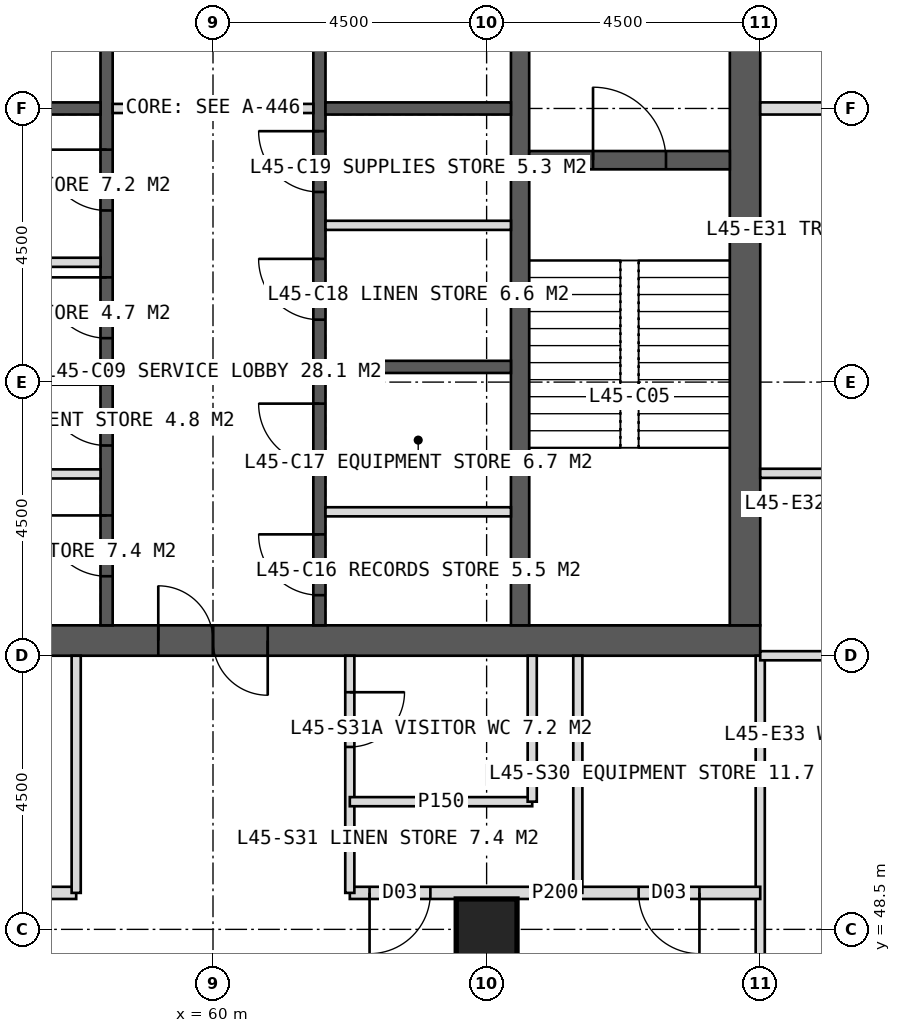
"""IFC4 building model, lengths in metres.
Left out: names, types, materials, properties, quantities, classifications, styles, units other than length and angle.
Written with IfcOpenShell. Run it as: python <this file> out.ifc"""

import sys

from ifc_helpers import new_model, si_unit, direction, frame, frame_2d, origin, origin_2d, place, context, subcontext, project, spatial, rectangle, hollow_rectangle, extrude, element, fill, save


model = new_model("IFC4")
c1 = context("Model", 3, precision=1e-05, world=origin(), true_north=direction((0.0, 1.0)))
c2 = subcontext(c1, "Body", "Model", "MODEL_VIEW")
j1 = project(units=[si_unit("LENGTHUNIT", "METRE"), si_unit("PLANEANGLEUNIT", "RADIAN")], contexts=[c1])
p1 = place(None, origin())
s1 = spatial("IfcSite", under=j1, at=p1, CompositionType="ELEMENT")
p2 = place(p1, origin())
s2 = spatial("IfcBuilding", under=s1, at=p2, CompositionType="ELEMENT")
p3 = place(p2, frame((0.0, 0.0, 189.0)))
s3 = spatial("IfcBuildingStorey", under=s2, at=p3, CompositionType="ELEMENT", Elevation=189.0)
p4 = place(p3, frame((51.0, 53.25, 0.0), z_axis=(0.0, 0.0, 1.0), x_axis=(1.0, 0.0, 0.0)))
e1 = element("IfcWall", 1, at=p4, inside=s3, PredefinedType="SHEAR", context=c2, shape_type="SweptSolid", body=[
    extrude(rectangle(XDim=18.0, YDim=0.5, at=frame_2d((9.0, 0.0))), origin(), (0.0, 0.0, 1.0), 4.0),
])
p5 = place(p4, frame((8.1, 0.0, 0.0)))
e2 = element("IfcOpeningElement", 2, at=p5, cuts=e1, PredefinedType="OPENING", context=c2, shape_type="SweptSolid", body=[
    extrude(rectangle(XDim=1.8, YDim=2.2, at=frame_2d((0.9, 1.1))), frame((0.0, 0.26, 0.0), z_axis=(0.0, -1.0, 0.0), x_axis=(1.0, 0.0, 0.0)), (0.0, 0.0, 1.0), 0.52),
])
p6 = place(p3, frame((68.75, 53.5, 0.0), z_axis=(0.0, 0.0, 1.0), x_axis=(0.0, 1.0, 0.0)))
e3 = element("IfcWall", 3, at=p6, inside=s3, PredefinedType="SHEAR", context=c2, shape_type="SweptSolid", body=[
    extrude(rectangle(XDim=17.0, YDim=0.5, at=frame_2d((8.5, 0.0))), origin(), (0.0, 0.0, 1.0), 4.0),
])
p7 = place(p6, frame((9.6, 0.0, 0.0)))
e4 = element("IfcOpeningElement", 4, at=p7, cuts=e3, PredefinedType="OPENING", context=c2, shape_type="SweptSolid", body=[
    extrude(rectangle(XDim=1.5, YDim=2.2, at=frame_2d((0.75, 1.1))), frame((0.0, 0.26, 0.0), z_axis=(0.0, -1.0, 0.0), x_axis=(1.0, 0.0, 0.0)), (0.0, 0.0, 1.0), 0.52),
])
p8 = place(p3, frame((65.05, 53.5, 0.0), z_axis=(0.0, 0.0, 1.0), x_axis=(0.0, 1.0, 0.0)))
e5 = element("IfcWall", 5, at=p8, inside=s3, PredefinedType="SHEAR", context=c2, shape_type="SweptSolid", body=[
    extrude(rectangle(XDim=17.0, YDim=0.3, at=frame_2d((8.5, 0.0))), origin(), (0.0, 0.0, 1.0), 4.0),
])
p9 = place(p3, frame((58.25, 53.5, 0.0), z_axis=(0.0, 0.0, 1.0), x_axis=(0.0, 1.0, 0.0)))
e6 = element("IfcWall", 6, at=p9, inside=s3, PredefinedType="SHEAR", context=c2, shape_type="SweptSolid", body=[
    extrude(rectangle(XDim=17.0, YDim=0.2, at=frame_2d((8.5, 0.0))), origin(), (0.0, 0.0, 1.0), 4.0),
])
p10 = place(p9, frame((0.808, 0.0, 0.0)))
e7 = element("IfcOpeningElement", 7, at=p10, cuts=e6, PredefinedType="OPENING", context=c2, shape_type="SweptSolid", body=[
    extrude(rectangle(XDim=1.0, YDim=2.1, at=frame_2d((0.5, 1.05))), frame((0.0, 0.11, 0.0), z_axis=(0.0, -1.0, 0.0), x_axis=(1.0, 0.0, 0.0)), (0.0, 0.0, 1.0), 0.22),
])
p11 = place(p9, frame((2.958, 0.0, 0.0)))
e8 = element("IfcOpeningElement", 8, at=p11, cuts=e6, PredefinedType="OPENING", context=c2, shape_type="SweptSolid", body=[
    extrude(rectangle(XDim=1.0, YDim=2.1, at=frame_2d((0.5, 1.05))), frame((0.0, 0.11, 0.0), z_axis=(0.0, -1.0, 0.0), x_axis=(1.0, 0.0, 0.0)), (0.0, 0.0, 1.0), 0.22),
])
p12 = place(p9, frame((4.722, 0.0, 0.0)))
e9 = element("IfcOpeningElement", 9, at=p12, cuts=e6, PredefinedType="OPENING", context=c2, shape_type="SweptSolid", body=[
    extrude(rectangle(XDim=1.0, YDim=2.1, at=frame_2d((0.5, 1.05))), frame((0.0, 0.11, 0.0), z_axis=(0.0, -1.0, 0.0), x_axis=(1.0, 0.0, 0.0)), (0.0, 0.0, 1.0), 0.22),
])
p13 = place(p9, frame((6.823, 0.0, 0.0)))
e10 = element("IfcOpeningElement", 10, at=p13, cuts=e6, PredefinedType="OPENING", context=c2, shape_type="SweptSolid", body=[
    extrude(rectangle(XDim=1.0, YDim=2.1, at=frame_2d((0.5, 1.05))), frame((0.0, 0.11, 0.0), z_axis=(0.0, -1.0, 0.0), x_axis=(1.0, 0.0, 0.0)), (0.0, 0.0, 1.0), 0.22),
])
p14 = place(p9, frame((10.025, 0.0, 0.0)))
e11 = element("IfcOpeningElement", 11, at=p14, cuts=e6, PredefinedType="OPENING", context=c2, shape_type="SweptSolid", body=[
    extrude(rectangle(XDim=1.4, YDim=2.2, at=frame_2d((0.7, 1.1))), frame((0.0, 0.11, 0.0), z_axis=(0.0, -1.0, 0.0), x_axis=(1.0, 0.0, 0.0)), (0.0, 0.0, 1.0), 0.22),
])
p15 = place(p9, frame((14.325, 0.0, 0.0)))
e12 = element("IfcOpeningElement", 12, at=p15, cuts=e6, PredefinedType="OPENING", context=c2, shape_type="SweptSolid", body=[
    extrude(rectangle(XDim=1.4, YDim=2.2, at=frame_2d((0.7, 1.1))), frame((0.0, 0.11, 0.0), z_axis=(0.0, -1.0, 0.0), x_axis=(1.0, 0.0, 0.0)), (0.0, 0.0, 1.0), 0.22),
])
p16 = place(p3, frame((61.75, 53.5, 0.0), z_axis=(0.0, 0.0, 1.0), x_axis=(0.0, 1.0, 0.0)))
e13 = element("IfcWall", 13, at=p16, inside=s3, PredefinedType="SHEAR", context=c2, shape_type="SweptSolid", body=[
    extrude(rectangle(XDim=17.0, YDim=0.2, at=frame_2d((8.5, 0.0))), origin(), (0.0, 0.0, 1.0), 4.0),
])
p17 = place(p16, frame((0.496, 0.0, 0.0)))
e14 = element("IfcOpeningElement", 14, at=p17, cuts=e13, PredefinedType="OPENING", context=c2, shape_type="SweptSolid", body=[
    extrude(rectangle(XDim=1.0, YDim=2.1, at=frame_2d((0.5, 1.05))), frame((0.0, 0.11, 0.0), z_axis=(0.0, -1.0, 0.0), x_axis=(1.0, 0.0, 0.0)), (0.0, 0.0, 1.0), 0.22),
])
p18 = place(p16, frame((2.646, 0.0, 0.0)))
e15 = element("IfcOpeningElement", 15, at=p18, cuts=e13, PredefinedType="OPENING", context=c2, shape_type="SweptSolid", body=[
    extrude(rectangle(XDim=1.0, YDim=2.1, at=frame_2d((0.5, 1.05))), frame((0.0, 0.11, 0.0), z_axis=(0.0, -1.0, 0.0), x_axis=(1.0, 0.0, 0.0)), (0.0, 0.0, 1.0), 0.22),
])
p19 = place(p16, frame((5.027, 0.0, 0.0)))
e16 = element("IfcOpeningElement", 16, at=p19, cuts=e13, PredefinedType="OPENING", context=c2, shape_type="SweptSolid", body=[
    extrude(rectangle(XDim=1.0, YDim=2.1, at=frame_2d((0.5, 1.05))), frame((0.0, 0.11, 0.0), z_axis=(0.0, -1.0, 0.0), x_axis=(1.0, 0.0, 0.0)), (0.0, 0.0, 1.0), 0.22),
])
p20 = place(p16, frame((7.126, 0.0, 0.0)))
e17 = element("IfcOpeningElement", 17, at=p20, cuts=e13, PredefinedType="OPENING", context=c2, shape_type="SweptSolid", body=[
    extrude(rectangle(XDim=1.0, YDim=2.1, at=frame_2d((0.5, 1.05))), frame((0.0, 0.11, 0.0), z_axis=(0.0, -1.0, 0.0), x_axis=(1.0, 0.0, 0.0)), (0.0, 0.0, 1.0), 0.22),
])
p21 = place(p16, frame((10.025, 0.0, 0.0)))
e18 = element("IfcOpeningElement", 18, at=p21, cuts=e13, PredefinedType="OPENING", context=c2, shape_type="SweptSolid", body=[
    extrude(rectangle(XDim=1.4, YDim=2.2, at=frame_2d((0.7, 1.1))), frame((0.0, 0.11, 0.0), z_axis=(0.0, -1.0, 0.0), x_axis=(1.0, 0.0, 0.0)), (0.0, 0.0, 1.0), 0.22),
])
p22 = place(p16, frame((14.325, 0.0, 0.0)))
e19 = element("IfcOpeningElement", 19, at=p22, cuts=e13, PredefinedType="OPENING", context=c2, shape_type="SweptSolid", body=[
    extrude(rectangle(XDim=1.4, YDim=2.2, at=frame_2d((0.7, 1.1))), frame((0.0, 0.11, 0.0), z_axis=(0.0, -1.0, 0.0), x_axis=(1.0, 0.0, 0.0)), (0.0, 0.0, 1.0), 0.22),
])
for number, where, z_axis, x_axis in (
    (20, (55.1, 57.75, 0.0), (0.0, 0.0, 1.0), (1.0, 0.0, 0.0)),
    (21, (61.85, 57.75, 0.0), (0.0, 0.0, 1.0), (1.0, 0.0, 0.0)),
    (22, (55.1, 62.0, 0.0), (0.0, 0.0, 1.0), (1.0, 0.0, 0.0)),
    (23, (61.85, 62.0, 0.0), (0.0, 0.0, 1.0), (1.0, 0.0, 0.0)),
):
    element("IfcWall", number, at=place(p3, frame(where, z_axis=z_axis, x_axis=x_axis)), inside=s3, PredefinedType="SHEAR", context=c2, shape_type="SweptSolid", body=[
        extrude(rectangle(XDim=3.05, YDim=0.2, at=frame_2d((1.525, 0.0))), origin(), (0.0, 0.0, 1.0), 4.0),
    ])
p23 = place(p3, frame((65.2, 61.15, 0.0), z_axis=(0.0, 0.0, 1.0), x_axis=(1.0, 0.0, 0.0)))
e24 = element("IfcWall", 24, at=p23, inside=s3, PredefinedType="SHEAR", context=c2, shape_type="SweptSolid", body=[
    extrude(rectangle(XDim=3.3, YDim=0.3, at=frame_2d((1.65, 0.0))), origin(), (0.0, 0.0, 1.0), 4.0),
])
p24 = place(p23, frame((1.05, 0.0, 0.0)))
e25 = element("IfcOpeningElement", 25, at=p24, cuts=e24, PredefinedType="OPENING", context=c2, shape_type="SweptSolid", body=[
    extrude(rectangle(XDim=1.2, YDim=2.1, at=frame_2d((0.6, 1.05))), frame((0.0, 0.16, 0.0), z_axis=(0.0, -1.0, 0.0), x_axis=(1.0, 0.0, 0.0)), (0.0, 0.0, 1.0), 0.32),
])
p25 = place(p3, frame((64.5, 48.5, 0.0), z_axis=(0.0, 0.0, 1.0), x_axis=(1.0, 0.0, 0.0)))
e26 = element("IfcColumn", 26, at=p25, inside=s3, PredefinedType="COLUMN", context=c2, shape_type="SweptSolid", body=[
    extrude(hollow_rectangle(XDim=1.0, YDim=1.0, WallThickness=0.1, at=origin_2d()), origin(), (0.0, 0.0, 1.0), 4.0),
])
p26 = place(p3, frame((69.0, 53.0, 0.0), z_axis=(0.0, 0.0, 1.0), x_axis=(0.0, -1.0, 0.0)))
e27 = element("IfcWall", 27, at=p26, inside=s3, PredefinedType="PARTITIONING", context=c2, shape_type="SweptSolid", body=[
    extrude(rectangle(XDim=5.4, YDim=0.15, at=frame_2d((2.7, 0.0))), origin(), (0.0, 0.0, 1.0), 3.75),
])
p27 = place(p3, frame((69.0, 49.1, 0.0), z_axis=(0.0, 0.0, 1.0), x_axis=(-1.0, 0.0, 0.0)))
e28 = element("IfcWall", 28, at=p27, inside=s3, PredefinedType="PARTITIONING", context=c2, shape_type="SweptSolid", body=[
    extrude(rectangle(XDim=6.75, YDim=0.2, at=frame_2d((3.375, 0.0))), origin(), (0.0, 0.0, 1.0), 3.75),
])
p28 = place(p27, frame((1.0, 0.0, 0.0)))
e29 = element("IfcOpeningElement", 29, at=p28, cuts=e28, PredefinedType="OPENING", context=c2, shape_type="SweptSolid", body=[
    extrude(rectangle(XDim=1.0, YDim=2.1, at=frame_2d((0.5, 1.05))), frame((0.0, 0.11, 0.0), z_axis=(0.0, -1.0, 0.0), x_axis=(1.0, 0.0, 0.0)), (0.0, 0.0, 1.0), 0.22),
])
p29 = place(p27, frame((5.425, 0.0, 0.0)))
e30 = element("IfcOpeningElement", 30, at=p29, cuts=e28, PredefinedType="OPENING", context=c2, shape_type="SweptSolid", body=[
    extrude(rectangle(XDim=1.0, YDim=2.1, at=frame_2d((0.5, 1.05))), frame((0.0, 0.11, 0.0), z_axis=(0.0, -1.0, 0.0), x_axis=(1.0, 0.0, 0.0)), (0.0, 0.0, 1.0), 0.22),
])
p30 = place(p3, frame((57.75, 49.1, 0.0), z_axis=(0.0, 0.0, 1.0), x_axis=(-1.0, 0.0, 0.0)))
e31 = element("IfcWall", 31, at=p30, inside=s3, PredefinedType="PARTITIONING", context=c2, shape_type="SweptSolid", body=[
    extrude(rectangle(XDim=12.15, YDim=0.2, at=frame_2d((6.075, 0.0))), origin(), (0.0, 0.0, 1.0), 3.75),
])
p31 = place(p30, frame((4.3, 0.0, 0.0)))
e32 = element("IfcOpeningElement", 32, at=p31, cuts=e31, PredefinedType="OPENING", context=c2, shape_type="SweptSolid", body=[
    extrude(rectangle(XDim=1.0, YDim=2.1, at=frame_2d((0.5, 1.05))), frame((0.0, 0.11, 0.0), z_axis=(0.0, -1.0, 0.0), x_axis=(1.0, 0.0, 0.0)), (0.0, 0.0, 1.0), 0.22),
])
p32 = place(p30, frame((8.95, 0.0, 0.0)))
e33 = element("IfcOpeningElement", 33, at=p32, cuts=e31, PredefinedType="OPENING", context=c2, shape_type="SweptSolid", body=[
    extrude(rectangle(XDim=1.0, YDim=2.1, at=frame_2d((0.5, 1.05))), frame((0.0, 0.11, 0.0), z_axis=(0.0, -1.0, 0.0), x_axis=(1.0, 0.0, 0.0)), (0.0, 0.0, 1.0), 0.22),
])
p33 = place(p3, frame((62.25, 53.0, 0.0), z_axis=(0.0, 0.0, 1.0), x_axis=(0.0, -1.0, 0.0)))
e34 = element("IfcWall", 34, at=p33, inside=s3, PredefinedType="PARTITIONING", context=c2, shape_type="SweptSolid", body=[
    extrude(rectangle(XDim=3.9, YDim=0.15, at=frame_2d((1.95, 0.0))), origin(), (0.0, 0.0, 1.0), 3.75),
])
p34 = place(p33, frame((0.6, 0.0, 0.0)))
e35 = element("IfcOpeningElement", 35, at=p34, cuts=e34, PredefinedType="OPENING", context=c2, shape_type="SweptSolid", body=[
    extrude(rectangle(XDim=0.9, YDim=2.1, at=frame_2d((0.45, 1.05))), frame((0.0, 0.085, 0.0), z_axis=(0.0, -1.0, 0.0), x_axis=(1.0, 0.0, 0.0)), (0.0, 0.0, 1.0), 0.17),
])
for number, where, z_axis, x_axis in (
    (36, (57.75, 53.0, 0.0), (0.0, 0.0, 1.0), (0.0, -1.0, 0.0)),
    (37, (66.0, 53.0, 0.0), (0.0, 0.0, 1.0), (0.0, -1.0, 0.0)),
):
    element("IfcWall", number, at=place(p3, frame(where, z_axis=z_axis, x_axis=x_axis)), inside=s3, PredefinedType="PARTITIONING", context=c2, shape_type="SweptSolid", body=[
        extrude(rectangle(XDim=3.9, YDim=0.15, at=frame_2d((1.95, 0.0))), origin(), (0.0, 0.0, 1.0), 3.75),
    ])
p35 = place(p3, frame((65.25, 50.6, 0.0), z_axis=(0.0, 0.0, 1.0), x_axis=(-1.0, 0.0, 0.0)))
e38 = element("IfcWall", 38, at=p35, inside=s3, PredefinedType="PARTITIONING", context=c2, shape_type="SweptSolid", body=[
    extrude(rectangle(XDim=3.0, YDim=0.15, at=frame_2d((1.5, 0.0))), origin(), (0.0, 0.0, 1.0), 3.75),
])
p36 = place(p3, frame((65.25, 53.0, 0.0), z_axis=(0.0, 0.0, 1.0), x_axis=(0.0, -1.0, 0.0)))
e39 = element("IfcWall", 39, at=p36, inside=s3, PredefinedType="PARTITIONING", context=c2, shape_type="SweptSolid", body=[
    extrude(rectangle(XDim=2.4, YDim=0.15, at=frame_2d((1.2, 0.0))), origin(), (0.0, 0.0, 1.0), 3.75),
])
p37 = place(p3, frame((69.0, 62.0, 0.0), z_axis=(0.0, 0.0, 1.0), x_axis=(1.0, 0.0, 0.0)))
e40 = element("IfcWall", 40, at=p37, inside=s3, PredefinedType="SOLIDWALL", context=c2, shape_type="SweptSolid", body=[
    extrude(rectangle(XDim=5.4, YDim=0.2, at=frame_2d((2.7, 0.0))), origin(), (0.0, 0.0, 1.0), 2.95),
])
for number, where, z_axis, x_axis in (
    (41, (69.0, 56.0, 0.0), (0.0, 0.0, 1.0), (1.0, 0.0, 0.0)),
    (42, (69.0, 53.0, 0.0), (0.0, 0.0, 1.0), (1.0, 0.0, 0.0)),
):
    element("IfcWall", number, at=place(p3, frame(where, z_axis=z_axis, x_axis=x_axis)), inside=s3, PredefinedType="PARTITIONING", context=c2, shape_type="SweptSolid", body=[
        extrude(rectangle(XDim=5.4, YDim=0.15, at=frame_2d((2.7, 0.0))), origin(), (0.0, 0.0, 1.0), 3.75),
    ])
for number, where, z_axis, x_axis in (
    (43, (55.1, 55.99, 0.0), (0.0, 0.0, 1.0), (1.0, 0.0, 0.0)),
    (44, (61.85, 55.367, 0.0), (0.0, 0.0, 1.0), (1.0, 0.0, 0.0)),
    (45, (55.1, 59.47, 0.0), (0.0, 0.0, 1.0), (1.0, 0.0, 0.0)),
    (46, (61.85, 60.078, 0.0), (0.0, 0.0, 1.0), (1.0, 0.0, 0.0)),
):
    element("IfcWall", number, at=place(p3, frame(where, z_axis=z_axis, x_axis=x_axis)), inside=s3, PredefinedType="PARTITIONING", context=c2, shape_type="SweptSolid", body=[
        extrude(rectangle(XDim=3.05, YDim=0.15, at=frame_2d((1.525, 0.0))), origin(), (0.0, 0.0, 1.0), 3.75),
    ])
p38 = place(p3, frame((58.35, 62.0, 0.0), z_axis=(0.0, 0.0, 1.0), x_axis=(1.0, 0.0, 0.0)))
e47 = element("IfcWall", 47, at=p38, inside=s3, PredefinedType="PARTITIONING", context=c2, shape_type="SweptSolid", body=[
    extrude(rectangle(XDim=3.3, YDim=0.15, at=frame_2d((1.65, 0.0))), origin(), (0.0, 0.0, 1.0), 3.75),
])
p39 = place(p28, origin())
e48 = element("IfcDoor", 48, at=p39, inside=s3, OperationType="SINGLE_SWING_LEFT", PredefinedType="DOOR", context=c2, shape_type="SweptSolid", body=[
    extrude(rectangle(XDim=1.0, YDim=2.1, at=frame_2d((0.5, 1.05))), frame((0.0, 0.025, 0.0), z_axis=(0.0, -1.0, 0.0), x_axis=(1.0, 0.0, 0.0)), (0.0, 0.0, 1.0), 0.05),
])
fill(e29, e48)
p40 = place(p34, origin())
e49 = element("IfcDoor", 49, at=p40, inside=s3, OperationType="SINGLE_SWING_LEFT", PredefinedType="DOOR", context=c2, shape_type="SweptSolid", body=[
    extrude(rectangle(XDim=0.9, YDim=2.1, at=frame_2d((0.45, 1.05))), frame((0.0, 0.025, 0.0), z_axis=(0.0, -1.0, 0.0), x_axis=(1.0, 0.0, 0.0)), (0.0, 0.0, 1.0), 0.05),
])
fill(e35, e49)
p41 = place(p29, origin())
e50 = element("IfcDoor", 50, at=p41, inside=s3, OperationType="SINGLE_SWING_RIGHT", PredefinedType="DOOR", context=c2, shape_type="SweptSolid", body=[
    extrude(rectangle(XDim=1.0, YDim=2.1, at=frame_2d((0.5, 1.05))), frame((0.0, 0.025, 0.0), z_axis=(0.0, -1.0, 0.0), x_axis=(1.0, 0.0, 0.0)), (0.0, 0.0, 1.0), 0.05),
])
fill(e30, e50)
p42 = place(p24, origin())
e51 = element("IfcDoor", 51, at=p42, inside=s3, OperationType="SINGLE_SWING_LEFT", PredefinedType="DOOR", context=c2, shape_type="SweptSolid", body=[
    extrude(rectangle(XDim=1.2, YDim=2.1, at=frame_2d((0.6, 1.05))), frame((0.0, 0.025, 0.0), z_axis=(0.0, -1.0, 0.0), x_axis=(1.0, 0.0, 0.0)), (0.0, 0.0, 1.0), 0.05),
])
fill(e25, e51)
p43 = place(p10, origin())
e52 = element("IfcDoor", 52, at=p43, inside=s3, OperationType="SINGLE_SWING_RIGHT", PredefinedType="DOOR", context=c2, shape_type="SweptSolid", body=[
    extrude(rectangle(XDim=1.0, YDim=2.1, at=frame_2d((0.5, 1.05))), frame((0.0, 0.025, 0.0), z_axis=(0.0, -1.0, 0.0), x_axis=(1.0, 0.0, 0.0)), (0.0, 0.0, 1.0), 0.05),
])
fill(e7, e52)
p44 = place(p11, origin())
e53 = element("IfcDoor", 53, at=p44, inside=s3, OperationType="SINGLE_SWING_RIGHT", PredefinedType="DOOR", context=c2, shape_type="SweptSolid", body=[
    extrude(rectangle(XDim=1.0, YDim=2.1, at=frame_2d((0.5, 1.05))), frame((0.0, 0.025, 0.0), z_axis=(0.0, -1.0, 0.0), x_axis=(1.0, 0.0, 0.0)), (0.0, 0.0, 1.0), 0.05),
])
fill(e8, e53)
p45 = place(p17, origin())
e54 = element("IfcDoor", 54, at=p45, inside=s3, OperationType="SINGLE_SWING_RIGHT", PredefinedType="DOOR", context=c2, shape_type="SweptSolid", body=[
    extrude(rectangle(XDim=1.0, YDim=2.1, at=frame_2d((0.5, 1.05))), frame((0.0, 0.025, 0.0), z_axis=(0.0, -1.0, 0.0), x_axis=(1.0, 0.0, 0.0)), (0.0, 0.0, 1.0), 0.05),
])
fill(e14, e54)
p46 = place(p18, origin())
e55 = element("IfcDoor", 55, at=p46, inside=s3, OperationType="SINGLE_SWING_RIGHT", PredefinedType="DOOR", context=c2, shape_type="SweptSolid", body=[
    extrude(rectangle(XDim=1.0, YDim=2.1, at=frame_2d((0.5, 1.05))), frame((0.0, 0.025, 0.0), z_axis=(0.0, -1.0, 0.0), x_axis=(1.0, 0.0, 0.0)), (0.0, 0.0, 1.0), 0.05),
])
fill(e15, e55)
p47 = place(p12, origin())
e56 = element("IfcDoor", 56, at=p47, inside=s3, OperationType="SINGLE_SWING_RIGHT", PredefinedType="DOOR", context=c2, shape_type="SweptSolid", body=[
    extrude(rectangle(XDim=1.0, YDim=2.1, at=frame_2d((0.5, 1.05))), frame((0.0, 0.025, 0.0), z_axis=(0.0, -1.0, 0.0), x_axis=(1.0, 0.0, 0.0)), (0.0, 0.0, 1.0), 0.05),
])
fill(e9, e56)
p48 = place(p13, origin())
e57 = element("IfcDoor", 57, at=p48, inside=s3, OperationType="SINGLE_SWING_RIGHT", PredefinedType="DOOR", context=c2, shape_type="SweptSolid", body=[
    extrude(rectangle(XDim=1.0, YDim=2.1, at=frame_2d((0.5, 1.05))), frame((0.0, 0.025, 0.0), z_axis=(0.0, -1.0, 0.0), x_axis=(1.0, 0.0, 0.0)), (0.0, 0.0, 1.0), 0.05),
])
fill(e10, e57)
p49 = place(p19, origin())
e58 = element("IfcDoor", 58, at=p49, inside=s3, OperationType="SINGLE_SWING_RIGHT", PredefinedType="DOOR", context=c2, shape_type="SweptSolid", body=[
    extrude(rectangle(XDim=1.0, YDim=2.1, at=frame_2d((0.5, 1.05))), frame((0.0, 0.025, 0.0), z_axis=(0.0, -1.0, 0.0), x_axis=(1.0, 0.0, 0.0)), (0.0, 0.0, 1.0), 0.05),
])
fill(e16, e58)
p50 = place(p20, origin())
e59 = element("IfcDoor", 59, at=p50, inside=s3, OperationType="SINGLE_SWING_RIGHT", PredefinedType="DOOR", context=c2, shape_type="SweptSolid", body=[
    extrude(rectangle(XDim=1.0, YDim=2.1, at=frame_2d((0.5, 1.05))), frame((0.0, 0.025, 0.0), z_axis=(0.0, -1.0, 0.0), x_axis=(1.0, 0.0, 0.0)), (0.0, 0.0, 1.0), 0.05),
])
fill(e17, e59)
p51 = place(p5, origin())
e60 = element("IfcDoor", 60, at=p51, inside=s3, OperationType="DOUBLE_DOOR_SINGLE_SWING", PredefinedType="DOOR", context=c2, shape_type="SweptSolid", body=[
    extrude(rectangle(XDim=1.8, YDim=2.2, at=frame_2d((0.9, 1.1))), frame((0.0, 0.025, 0.0), z_axis=(0.0, -1.0, 0.0), x_axis=(1.0, 0.0, 0.0)), (0.0, 0.0, 1.0), 0.05),
])
fill(e2, e60)
save(model, sys.argv[1])
